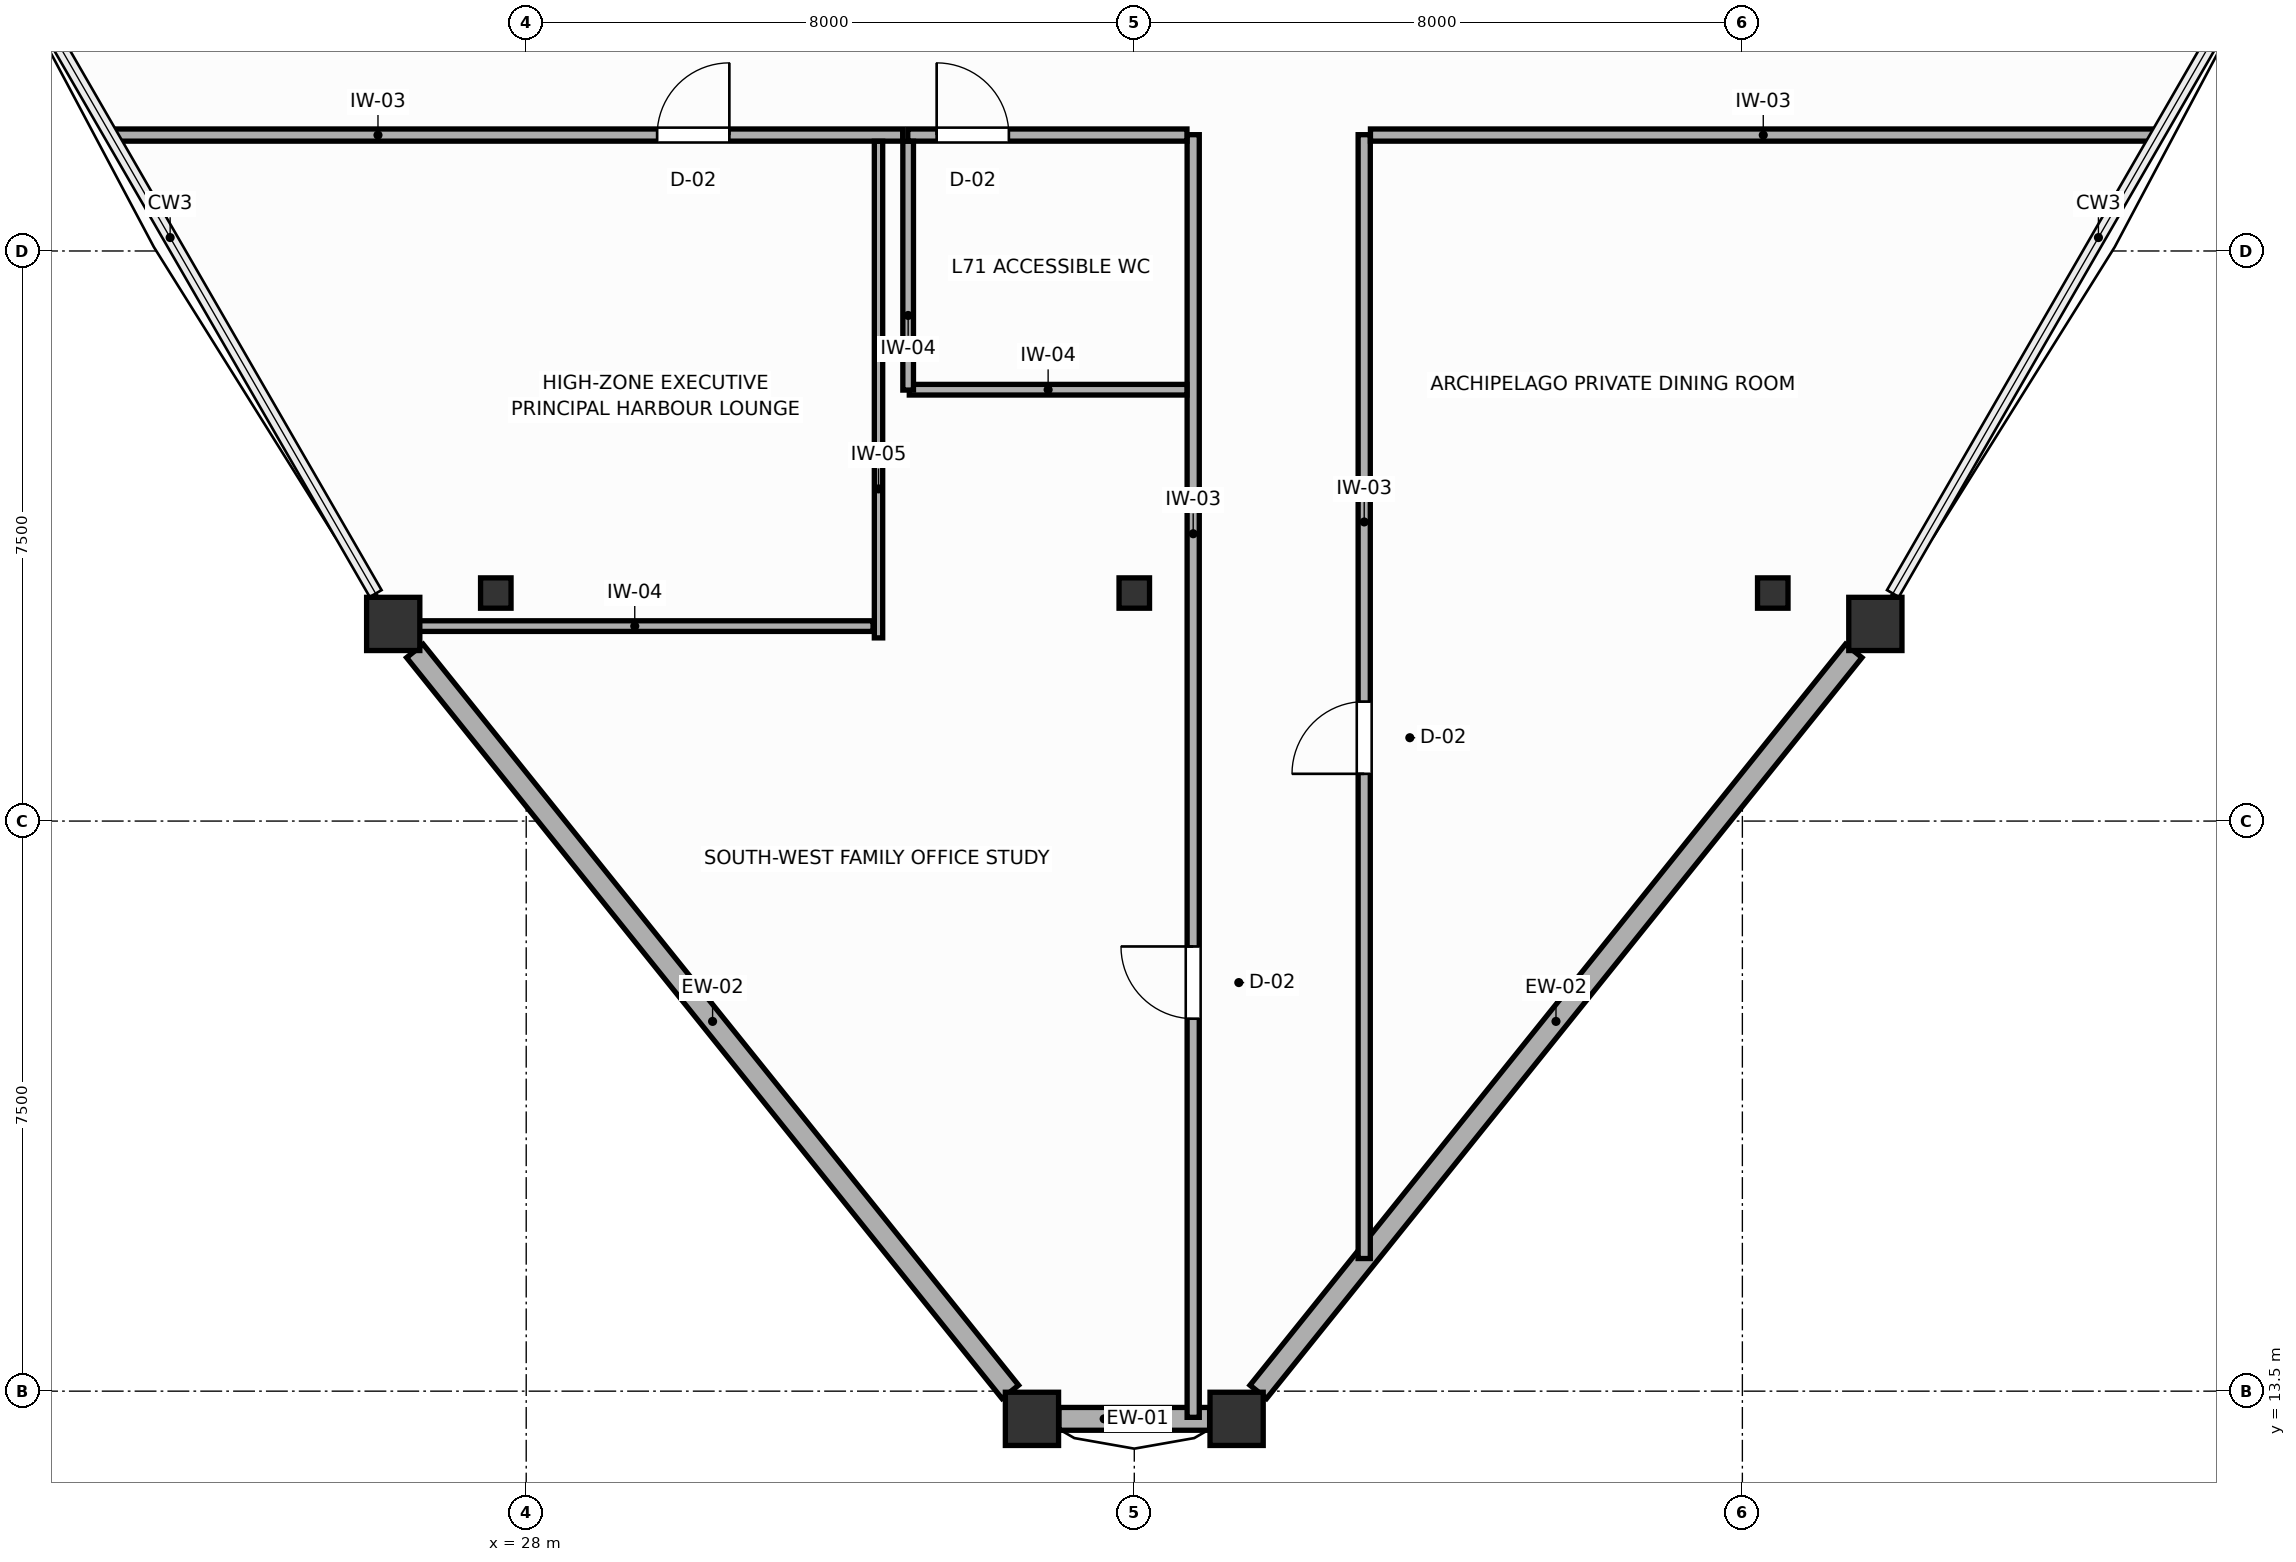
"""IFC4 building model, lengths in metres.
Left out: names, types, materials, properties, quantities, classifications, styles, units other than length and angle.
Written with IfcOpenShell. Run it as: python <this file> out.ifc"""

import sys

from ifc_helpers import new_model, si_unit, direction, frame, frame_2d, origin, origin_2d, place, context, subcontext, project, spatial, rectangle, i_section, extrude, source, transform, mapped, element, fill, save


model = new_model("IFC4")
c1 = context("Model", 3, precision=1e-05, world=origin(), true_north=direction((0.0, 1.0)))
c2 = subcontext(c1, "Body", "Model", "MODEL_VIEW")
j1 = project(units=[si_unit("LENGTHUNIT", "METRE"), si_unit("PLANEANGLEUNIT", "RADIAN")], contexts=[c1])
p1 = place(None, origin())
s1 = spatial("IfcSite", under=j1, at=p1, CompositionType="ELEMENT")
p2 = place(p1, origin())
s2 = spatial("IfcBuilding", under=s1, at=p2, CompositionType="ELEMENT")
p3 = place(p2, frame((0.0, 0.0, 271.8)))
s3 = spatial("IfcBuildingStorey", under=s2, at=p3, CompositionType="ELEMENT", Elevation=271.8)
m1 = source(origin(), c2, "Body", "SweptSolid", [
    extrude(i_section(OverallWidth=0.401, OverallDepth=0.399, WebThickness=0.022, FlangeThickness=0.036, FilletRadius=0.015, at=origin_2d()), origin(), (0.0, 0.0, 1.0), 3.6),
])
for number, where, z_axis, x_axis in (
    (1, (27.6, 24.0, 0.0), (0.0, 0.0, 1.0), (1.0, 0.0, 0.0)),
    (2, (44.4, 24.0, 0.0), (0.0, 0.0, 1.0), (1.0, 0.0, 0.0)),
    (3, (36.0, 24.0, 0.0), (0.0, 0.0, 1.0), (1.0, 0.0, 0.0)),
):
    element("IfcColumn", number, at=place(p3, frame(where, z_axis=z_axis, x_axis=x_axis)), inside=s3, PredefinedType="COLUMN", context=c2, shape_type="MappedRepresentation", body=[
        mapped(m1, transform((0.0, 0.0, 0.0), scale=1.0)),
    ])
m2 = source(origin(), c2, "Body", "SweptSolid", [
    extrude(rectangle(XDim=0.7, YDim=0.7, at=origin_2d()), origin(), (0.0, 0.0, 1.0), 3.6),
])
for number, where, z_axis, x_axis in (
    (4, (26.25, 23.594, 0.0), (0.0, 0.0, 1.0), (1.0, 0.0, 0.0)),
    (5, (34.654, 13.135, 0.0), (0.0, 0.0, 1.0), (1.0, 0.0, 0.0)),
    (6, (37.346, 13.135, 0.0), (0.0, 0.0, 1.0), (1.0, 0.0, 0.0)),
    (7, (45.75, 23.594, 0.0), (0.0, 0.0, 1.0), (1.0, 0.0, 0.0)),
):
    element("IfcColumn", number, at=place(p3, frame(where, z_axis=z_axis, x_axis=x_axis)), inside=s3, PredefinedType="COLUMN", context=c2, shape_type="MappedRepresentation", body=[
        mapped(m2, transform((0.0, 0.0, 0.0), scale=1.0)),
    ])
p4 = place(p3, frame((26.536, 23.239, 0.0), z_axis=(0.0, 0.0, 1.0), x_axis=(0.626367381926, -0.779528000048, 0.0)))
e8 = element("IfcWall", 8, at=p4, inside=s3, PredefinedType="SOLIDWALL", context=c2, shape_type="SweptSolid", body=[
    extrude(rectangle(XDim=12.505, YDim=0.28, at=frame_2d((6.252, 0.0))), origin(), (0.0, 0.0, 1.0), 2.04),
])
p5 = place(p3, frame((35.009, 13.135, 0.0), z_axis=(0.0, 0.0, 1.0), x_axis=(1.0, 0.0, 0.0)))
e9 = element("IfcWall", 9, at=p5, inside=s3, PredefinedType="SOLIDWALL", context=c2, shape_type="SweptSolid", body=[
    extrude(rectangle(XDim=1.982, YDim=0.3, at=frame_2d((0.991, 0.0))), origin(), (0.0, 0.0, 1.0), 2.04),
])
p6 = place(p3, frame((37.632, 13.49, 0.0), z_axis=(0.0, 0.0, 1.0), x_axis=(0.626367381926, 0.779528000048, 0.0)))
e10 = element("IfcWall", 10, at=p6, inside=s3, PredefinedType="SOLIDWALL", context=c2, shape_type="SweptSolid", body=[
    extrude(rectangle(XDim=12.505, YDim=0.28, at=frame_2d((6.252, 0.0))), origin(), (0.0, 0.0, 1.0), 2.04),
])
p7 = place(p3, frame((36.775, 13.156, 0.0), z_axis=(0.0, 0.0, 1.0), x_axis=(0.0, 1.0, 0.0)))
e11 = element("IfcWall", 11, at=p7, inside=s3, PredefinedType="PARTITIONING", context=c2, shape_type="SweptSolid", body=[
    extrude(rectangle(XDim=16.875, YDim=0.16, at=frame_2d((8.437, 0.0))), origin(), (0.0, 0.0, 1.0), 3.18),
])
p8 = place(p7, frame((5.245, 0.0, 0.0)))
e12 = element("IfcOpeningElement", 12, at=p8, cuts=e11, PredefinedType="OPENING", context=c2, shape_type="SweptSolid", body=[
    extrude(rectangle(XDim=0.95, YDim=2.05, at=frame_2d((0.475, 1.025))), frame((0.0, 0.09, 0.0), z_axis=(0.0, -1.0, 0.0), x_axis=(1.0, 0.0, 0.0)), (0.0, 0.0, 1.0), 0.18),
])
p9 = place(p3, frame((39.025, 15.245, 0.0), z_axis=(0.0, 0.0, 1.0), x_axis=(0.0, 1.0, 0.0)))
e13 = element("IfcWall", 13, at=p9, inside=s3, PredefinedType="PARTITIONING", context=c2, shape_type="SweptSolid", body=[
    extrude(rectangle(XDim=14.785, YDim=0.16, at=frame_2d((7.393, 0.0))), origin(), (0.0, 0.0, 1.0), 3.18),
])
p10 = place(p9, frame((6.377, 0.0, 0.0)))
e14 = element("IfcOpeningElement", 14, at=p10, cuts=e13, PredefinedType="OPENING", context=c2, shape_type="SweptSolid", body=[
    extrude(rectangle(XDim=0.95, YDim=2.05, at=frame_2d((0.475, 1.025))), frame((0.0, 0.09, 0.0), z_axis=(0.0, -1.0, 0.0), x_axis=(1.0, 0.0, 0.0)), (0.0, 0.0, 1.0), 0.18),
])
p11 = place(p3, frame((39.107, 30.025, 0.0), z_axis=(0.0, 0.0, 1.0), x_axis=(1.0, 0.0, 0.0)))
e15 = element("IfcWall", 15, at=p11, inside=s3, PredefinedType="PARTITIONING", context=c2, shape_type="SweptSolid", body=[
    extrude(rectangle(XDim=10.336, YDim=0.16, at=frame_2d((5.168, 0.0))), origin(), (0.0, 0.0, 1.0), 3.18),
])
p12 = place(p3, frame((22.557, 30.025, 0.0), z_axis=(0.0, 0.0, 1.0), x_axis=(1.0, 0.0, 0.0)))
e16 = element("IfcWall", 16, at=p12, inside=s3, PredefinedType="PARTITIONING", context=c2, shape_type="SweptSolid", body=[
    extrude(rectangle(XDim=10.396, YDim=0.16, at=frame_2d((5.198, 0.0))), origin(), (0.0, 0.0, 1.0), 3.18),
])
p13 = place(p12, frame((7.166, 0.0, 0.0)))
e17 = element("IfcOpeningElement", 17, at=p13, cuts=e16, PredefinedType="OPENING", context=c2, shape_type="SweptSolid", body=[
    extrude(rectangle(XDim=0.95, YDim=2.05, at=frame_2d((0.475, 1.025))), frame((0.0, 0.09, 0.0), z_axis=(0.0, -1.0, 0.0), x_axis=(1.0, 0.0, 0.0)), (0.0, 0.0, 1.0), 0.18),
])
p14 = place(p3, frame((33.02, 30.025, 0.0), z_axis=(0.0, 0.0, 1.0), x_axis=(1.0, 0.0, 0.0)))
e18 = element("IfcWall", 18, at=p14, inside=s3, PredefinedType="PARTITIONING", context=c2, shape_type="SweptSolid", body=[
    extrude(rectangle(XDim=3.673, YDim=0.16, at=frame_2d((1.836, 0.0))), origin(), (0.0, 0.0, 1.0), 3.18),
])
p15 = place(p14, frame((0.38, 0.0, 0.0)))
e19 = element("IfcOpeningElement", 19, at=p15, cuts=e18, PredefinedType="OPENING", context=c2, shape_type="SweptSolid", body=[
    extrude(rectangle(XDim=0.95, YDim=2.05, at=frame_2d((0.475, 1.025))), frame((0.0, 0.09, 0.0), z_axis=(0.0, -1.0, 0.0), x_axis=(1.0, 0.0, 0.0)), (0.0, 0.0, 1.0), 0.18),
])
p16 = place(p3, frame((32.635, 23.41, 0.0), z_axis=(0.0, 0.0, 1.0), x_axis=(0.0, 1.0, 0.0)))
e20 = element("IfcWall", 20, at=p16, inside=s3, PredefinedType="MOVABLE", context=c2, shape_type="SweptSolid", body=[
    extrude(rectangle(XDim=6.533, YDim=0.11, at=frame_2d((3.267, 0.0))), origin(), (0.0, 0.0, 1.0), 2.04),
])
p17 = place(p3, frame((26.293, 23.565, 0.0), z_axis=(0.0, 0.0, 1.0), x_axis=(1.0, 0.0, 0.0)))
e21 = element("IfcWall", 21, at=p17, inside=s3, PredefinedType="PARTITIONING", context=c2, shape_type="SweptSolid", body=[
    extrude(rectangle(XDim=6.27, YDim=0.14, at=frame_2d((3.135, 0.0))), origin(), (0.0, 0.0, 1.0), 2.04),
])
p18 = place(p3, frame((33.04, 26.675, 0.0), z_axis=(0.0, 0.0, 1.0), x_axis=(1.0, 0.0, 0.0)))
e22 = element("IfcWall", 22, at=p18, inside=s3, PredefinedType="PARTITIONING", context=c2, shape_type="SweptSolid", body=[
    extrude(rectangle(XDim=3.653, YDim=0.14, at=frame_2d((1.827, 0.0))), origin(), (0.0, 0.0, 1.0), 3.18),
])
p19 = place(p3, frame((33.025, 26.67, 0.0), z_axis=(0.0, 0.0, 1.0), x_axis=(0.0, 1.0, 0.0)))
e23 = element("IfcWall", 23, at=p19, inside=s3, PredefinedType="PARTITIONING", context=c2, shape_type="SweptSolid", body=[
    extrude(rectangle(XDim=3.273, YDim=0.14, at=frame_2d((1.637, 0.0))), origin(), (0.0, 0.0, 1.0), 2.04),
])
p20 = place(p8, origin())
e24 = element("IfcDoor", 24, at=p20, inside=s3, OperationType="SINGLE_SWING_RIGHT", PredefinedType="DOOR", context=c2, shape_type="SweptSolid", body=[
    extrude(rectangle(XDim=0.95, YDim=2.05, at=frame_2d((0.475, 1.025))), frame((0.0, 0.025, 0.0), z_axis=(0.0, -1.0, 0.0), x_axis=(1.0, 0.0, 0.0)), (0.0, 0.0, 1.0), 0.05),
])
fill(e12, e24)
p21 = place(p10, origin())
e25 = element("IfcDoor", 25, at=p21, inside=s3, OperationType="SINGLE_SWING_LEFT", PredefinedType="DOOR", context=c2, shape_type="SweptSolid", body=[
    extrude(rectangle(XDim=0.95, YDim=2.05, at=frame_2d((0.475, 1.025))), frame((0.0, 0.025, 0.0), z_axis=(0.0, -1.0, 0.0), x_axis=(1.0, 0.0, 0.0)), (0.0, 0.0, 1.0), 0.05),
])
fill(e14, e25)
p22 = place(p13, origin())
e26 = element("IfcDoor", 26, at=p22, inside=s3, OperationType="SINGLE_SWING_RIGHT", PredefinedType="DOOR", context=c2, shape_type="SweptSolid", body=[
    extrude(rectangle(XDim=0.95, YDim=2.05, at=frame_2d((0.475, 1.025))), frame((0.0, 0.025, 0.0), z_axis=(0.0, -1.0, 0.0), x_axis=(1.0, 0.0, 0.0)), (0.0, 0.0, 1.0), 0.05),
])
fill(e17, e26)
p23 = place(p15, origin())
e27 = element("IfcDoor", 27, at=p23, inside=s3, OperationType="SINGLE_SWING_LEFT", PredefinedType="DOOR", context=c2, shape_type="SweptSolid", body=[
    extrude(rectangle(XDim=0.95, YDim=2.05, at=frame_2d((0.475, 1.025))), frame((0.0, 0.025, 0.0), z_axis=(0.0, -1.0, 0.0), x_axis=(1.0, 0.0, 0.0)), (0.0, 0.0, 1.0), 0.05),
])
fill(e19, e27)
save(model, sys.argv[1])
